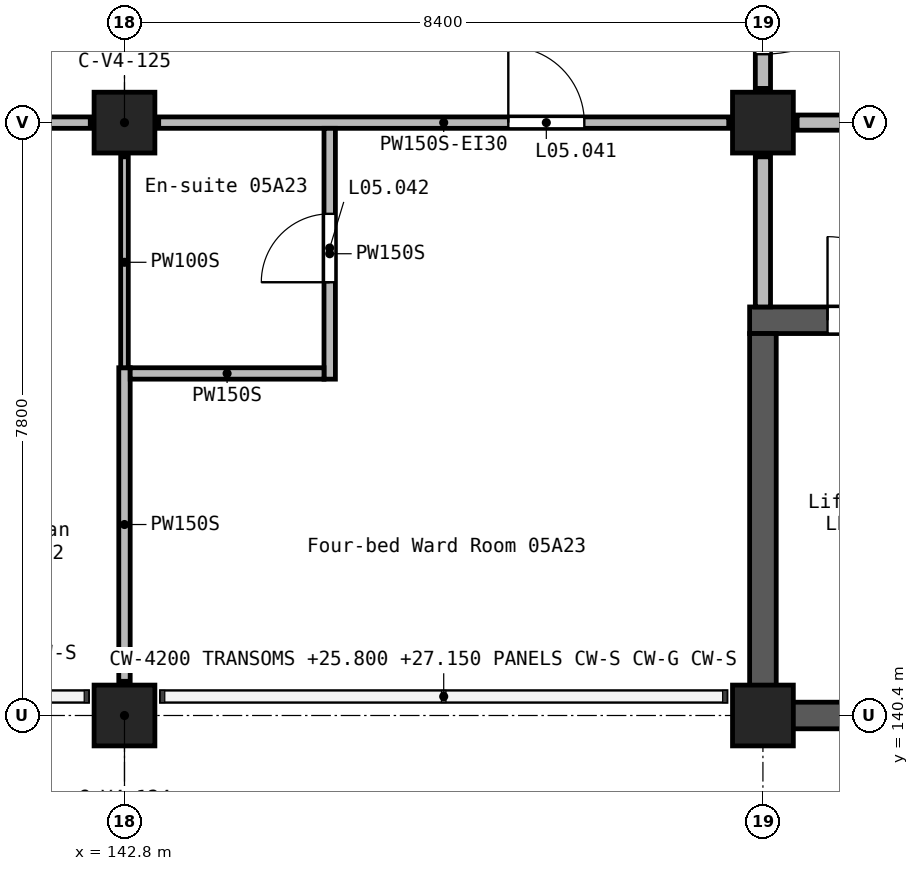
"""IFC4 building model, lengths in metres.
Left out: names, types, materials, properties, quantities, classifications, styles, units other than length and angle.
Written with IfcOpenShell. Run it as: python <this file> out.ifc"""

import sys

from ifc_helpers import new_model, si_unit, direction, frame, frame_2d, origin, origin_2d, place, context, subcontext, project, spatial, rectangle, extrude, element, fill, save


model = new_model("IFC4")
c1 = context("Model", 3, precision=1e-05, world=origin(), true_north=direction((0.0, 1.0)))
c2 = subcontext(c1, "Body", "Model", "MODEL_VIEW")
j1 = project(units=[si_unit("LENGTHUNIT", "METRE"), si_unit("PLANEANGLEUNIT", "RADIAN")], contexts=[c1])
p1 = place(None, origin())
s1 = spatial("IfcSite", under=j1, at=p1, CompositionType="ELEMENT")
p2 = place(p1, origin())
s2 = spatial("IfcBuilding", under=s1, at=p2, CompositionType="ELEMENT")
p3 = place(p2, frame((0.0, 0.0, 24.9)))
s3 = spatial("IfcBuildingStorey", under=s2, at=p3, CompositionType="ELEMENT", Elevation=24.9)
for number, where, z_axis, x_axis in (
    (1, (142.8, 140.4, 0.0), (0.0, 0.0, 1.0), (1.0, 0.0, 0.0)),
    (2, (142.8, 148.2, 0.0), (0.0, 0.0, 1.0), (1.0, 0.0, 0.0)),
    (3, (151.2, 140.4, 0.0), (0.0, 0.0, 1.0), (1.0, 0.0, 0.0)),
    (4, (151.2, 148.2, 0.0), (0.0, 0.0, 1.0), (1.0, 0.0, 0.0)),
):
    element("IfcColumn", number, at=place(p3, frame(where, z_axis=z_axis, x_axis=x_axis)), inside=s3, PredefinedType="COLUMN", context=c2, shape_type="SweptSolid", body=[
        extrude(rectangle(XDim=0.8, YDim=0.8, at=origin_2d()), origin(), (0.0, 0.0, 1.0), 3.9),
    ])
p4 = place(p3, frame((151.025, 145.6, 0.0), z_axis=(0.0, 0.0, 1.0), x_axis=(1.0, 0.0, 0.0)))
e5 = element("IfcWall", 5, at=p4, inside=s3, PredefinedType="SHEAR", context=c2, shape_type="SweptSolid", body=[
    extrude(rectangle(XDim=2.975, YDim=0.35, at=frame_2d((1.488, 0.0))), origin(), (0.0, 0.0, 1.0), 3.9),
])
p5 = place(p4, frame((1.025, 0.0, 0.0)))
e6 = element("IfcOpeningElement", 6, at=p5, cuts=e5, PredefinedType="OPENING", context=c2, shape_type="SweptSolid", body=[
    extrude(rectangle(XDim=1.1, YDim=2.1, at=frame_2d((0.55, 1.05))), frame((0.0, 0.185, 0.0), z_axis=(0.0, -1.0, 0.0), x_axis=(1.0, 0.0, 0.0)), (0.0, 0.0, 1.0), 0.37),
])
p6 = place(p3, frame((151.2, 140.225, 0.0), z_axis=(0.0, 0.0, 1.0), x_axis=(0.0, 1.0, 0.0)))
e7 = element("IfcWall", 7, at=p6, inside=s3, PredefinedType="SHEAR", context=c2, shape_type="SweptSolid", body=[
    extrude(rectangle(XDim=5.2, YDim=0.35, at=frame_2d((2.6, 0.0))), origin(), (0.0, 0.0, 1.0), 3.9),
])
p7 = place(p3, frame((151.375, 140.4, 0.0), z_axis=(0.0, 0.0, 1.0), x_axis=(1.0, 0.0, 0.0)))
e8 = element("IfcWall", 8, at=p7, inside=s3, PredefinedType="SHEAR", context=c2, shape_type="SweptSolid", body=[
    extrude(rectangle(XDim=2.625, YDim=0.35, at=frame_2d((1.312, 0.0))), origin(), (0.0, 0.0, 1.0), 3.9),
])
p8 = place(p3, frame((151.2, 151.35, 0.0), z_axis=(0.0, 0.0, 1.0), x_axis=(0.0, -1.0, 0.0)))
e9 = element("IfcWall", 9, at=p8, inside=s3, PredefinedType="SOLIDWALL", context=c2, shape_type="SweptSolid", body=[
    extrude(rectangle(XDim=2.7, YDim=0.2, at=frame_2d((1.35, 0.0))), origin(), (0.0, 0.0, 1.0), 3.6),
])
p9 = place(p8, frame((0.45, 0.0, 0.0)))
e10 = element("IfcOpeningElement", 10, at=p9, cuts=e9, PredefinedType="OPENING", context=c2, shape_type="SweptSolid", body=[
    extrude(rectangle(XDim=1.8, YDim=2.1, at=frame_2d((0.9, 1.05))), frame((0.0, 0.11, 0.0), z_axis=(0.0, -1.0, 0.0), x_axis=(1.0, 0.0, 0.0)), (0.0, 0.0, 1.0), 0.22),
])
p10 = place(p3, frame((151.2, 147.75, 0.0), z_axis=(0.0, 0.0, 1.0), x_axis=(0.0, -1.0, 0.0)))
e11 = element("IfcWall", 11, at=p10, inside=s3, PredefinedType="SOLIDWALL", context=c2, shape_type="SweptSolid", body=[
    extrude(rectangle(XDim=1.975, YDim=0.2, at=frame_2d((0.988, 0.0))), origin(), (0.0, 0.0, 1.0), 3.6),
])
p11 = place(p3, frame((151.65, 148.2, 0.0), z_axis=(0.0, 0.0, 1.0), x_axis=(1.0, 0.0, 0.0)))
e12 = element("IfcWall", 12, at=p11, inside=s3, PredefinedType="SOLIDWALL", context=c2, shape_type="SweptSolid", body=[
    extrude(rectangle(XDim=7.5, YDim=0.2, at=frame_2d((3.75, 0.0))), origin(), (0.0, 0.0, 1.0), 3.6),
])
p12 = place(p11, frame((2.85, 0.0, 0.0)))
e13 = element("IfcOpeningElement", 13, at=p12, cuts=e12, PredefinedType="OPENING", context=c2, shape_type="SweptSolid", body=[
    extrude(rectangle(XDim=1.8, YDim=2.1, at=frame_2d((0.9, 1.05))), frame((0.0, 0.11, 0.0), z_axis=(0.0, -1.0, 0.0), x_axis=(1.0, 0.0, 0.0)), (0.0, 0.0, 1.0), 0.22),
])
p13 = place(p3, frame((143.25, 148.2, 0.0), z_axis=(0.0, 0.0, 1.0), x_axis=(1.0, 0.0, 0.0)))
e14 = element("IfcWall", 14, at=p13, inside=s3, PredefinedType="PARTITIONING", context=c2, shape_type="SweptSolid", body=[
    extrude(rectangle(XDim=7.5, YDim=0.15, at=frame_2d((3.75, 0.0))), origin(), (0.0, 0.0, 1.0), 3.6),
])
p14 = place(p13, frame((4.6, 0.0, 0.0)))
e15 = element("IfcOpeningElement", 15, at=p14, cuts=e14, PredefinedType="OPENING", context=c2, shape_type="SweptSolid", body=[
    extrude(rectangle(XDim=1.0, YDim=2.1, at=frame_2d((0.5, 1.05))), frame((0.0, 0.085, 0.0), z_axis=(0.0, -1.0, 0.0), x_axis=(1.0, 0.0, 0.0)), (0.0, 0.0, 1.0), 0.17),
])
p15 = place(p3, frame((138.675, 148.2, 0.0), z_axis=(0.0, 0.0, 1.0), x_axis=(1.0, 0.0, 0.0)))
e16 = element("IfcWall", 16, at=p15, inside=s3, PredefinedType="PARTITIONING", context=c2, shape_type="SweptSolid", body=[
    extrude(rectangle(XDim=3.675, YDim=0.15, at=frame_2d((1.837, 0.0))), origin(), (0.0, 0.0, 1.0), 3.6),
])
p16 = place(p15, frame((1.525, 0.0, 0.0)))
e17 = element("IfcOpeningElement", 17, at=p16, cuts=e16, PredefinedType="OPENING", context=c2, shape_type="SweptSolid", body=[
    extrude(rectangle(XDim=1.0, YDim=2.1, at=frame_2d((0.5, 1.05))), frame((0.0, 0.085, 0.0), z_axis=(0.0, -1.0, 0.0), x_axis=(1.0, 0.0, 0.0)), (0.0, 0.0, 1.0), 0.17),
])
p17 = place(p3, frame((142.8, 140.85, 0.0), z_axis=(0.0, 0.0, 1.0), x_axis=(0.0, 1.0, 0.0)))
e18 = element("IfcWall", 18, at=p17, inside=s3, PredefinedType="PARTITIONING", context=c2, shape_type="SweptSolid", body=[
    extrude(rectangle(XDim=4.125, YDim=0.15, at=frame_2d((2.062, 0.0))), origin(), (0.0, 0.0, 1.0), 3.6),
])
p18 = place(p3, frame((145.5, 144.825, 0.0), z_axis=(0.0, 0.0, 1.0), x_axis=(0.0, 1.0, 0.0)))
e19 = element("IfcWall", 19, at=p18, inside=s3, PredefinedType="PARTITIONING", context=c2, shape_type="SweptSolid", body=[
    extrude(rectangle(XDim=3.3, YDim=0.15, at=frame_2d((1.65, 0.0))), origin(), (0.0, 0.0, 1.0), 3.6),
])
p19 = place(p18, frame((1.275, 0.0, 0.0)))
e20 = element("IfcOpeningElement", 20, at=p19, cuts=e19, PredefinedType="OPENING", context=c2, shape_type="SweptSolid", body=[
    extrude(rectangle(XDim=0.9, YDim=2.1, at=frame_2d((0.45, 1.05))), frame((0.0, 0.085, 0.0), z_axis=(0.0, -1.0, 0.0), x_axis=(1.0, 0.0, 0.0)), (0.0, 0.0, 1.0), 0.17),
])
p20 = place(p3, frame((142.875, 144.9, 0.0), z_axis=(0.0, 0.0, 1.0), x_axis=(1.0, 0.0, 0.0)))
e21 = element("IfcWall", 21, at=p20, inside=s3, PredefinedType="PARTITIONING", context=c2, shape_type="SweptSolid", body=[
    extrude(rectangle(XDim=2.55, YDim=0.15, at=frame_2d((1.275, 0.0))), origin(), (0.0, 0.0, 1.0), 3.6),
])
p21 = place(p3, frame((142.8, 144.975, 0.0), z_axis=(0.0, 0.0, 1.0), x_axis=(0.0, 1.0, 0.0)))
e22 = element("IfcWall", 22, at=p21, inside=s3, PredefinedType="PARTITIONING", context=c2, shape_type="SweptSolid", body=[
    extrude(rectangle(XDim=2.775, YDim=0.1, at=frame_2d((1.387, 0.0))), origin(), (0.0, 0.0, 1.0), 3.6),
])
p22 = place(p9, origin())
e23 = element("IfcDoor", 23, at=p22, inside=s3, OperationType="DOUBLE_DOOR_SINGLE_SWING", PredefinedType="DOOR", context=c2, shape_type="SweptSolid", body=[
    extrude(rectangle(XDim=1.8, YDim=2.1, at=frame_2d((0.9, 1.05))), frame((0.0, 0.025, 0.0), z_axis=(0.0, -1.0, 0.0), x_axis=(1.0, 0.0, 0.0)), (0.0, 0.0, 1.0), 0.05),
])
fill(e10, e23)
p23 = place(p14, frame((1.0, 0.0, 0.0), z_axis=(0.0, 0.0, 1.0), x_axis=(-1.0, 0.0, 0.0)))
e24 = element("IfcDoor", 24, at=p23, inside=s3, OperationType="SINGLE_SWING_LEFT", PredefinedType="DOOR", context=c2, shape_type="SweptSolid", body=[
    extrude(rectangle(XDim=1.0, YDim=2.1, at=frame_2d((0.5, 1.05))), frame((0.0, 0.025, 0.0), z_axis=(0.0, -1.0, 0.0), x_axis=(1.0, 0.0, 0.0)), (0.0, 0.0, 1.0), 0.05),
])
fill(e15, e24)
p24 = place(p19, origin())
e25 = element("IfcDoor", 25, at=p24, inside=s3, OperationType="SINGLE_SWING_RIGHT", PredefinedType="DOOR", context=c2, shape_type="SweptSolid", body=[
    extrude(rectangle(XDim=0.9, YDim=2.1, at=frame_2d((0.45, 1.05))), frame((0.0, 0.025, 0.0), z_axis=(0.0, -1.0, 0.0), x_axis=(1.0, 0.0, 0.0)), (0.0, 0.0, 1.0), 0.05),
])
fill(e20, e25)
p25 = place(p5, origin())
e26 = element("IfcDoor", 26, at=p25, inside=s3, OperationType="DOUBLE_DOOR_SLIDING", PredefinedType="DOOR", context=c2, shape_type="SweptSolid", body=[
    extrude(rectangle(XDim=1.1, YDim=2.1, at=frame_2d((0.55, 1.05))), frame((0.0, 0.025, 0.0), z_axis=(0.0, -1.0, 0.0), x_axis=(1.0, 0.0, 0.0)), (0.0, 0.0, 1.0), 0.05),
])
fill(e6, e26)
save(model, sys.argv[1])
